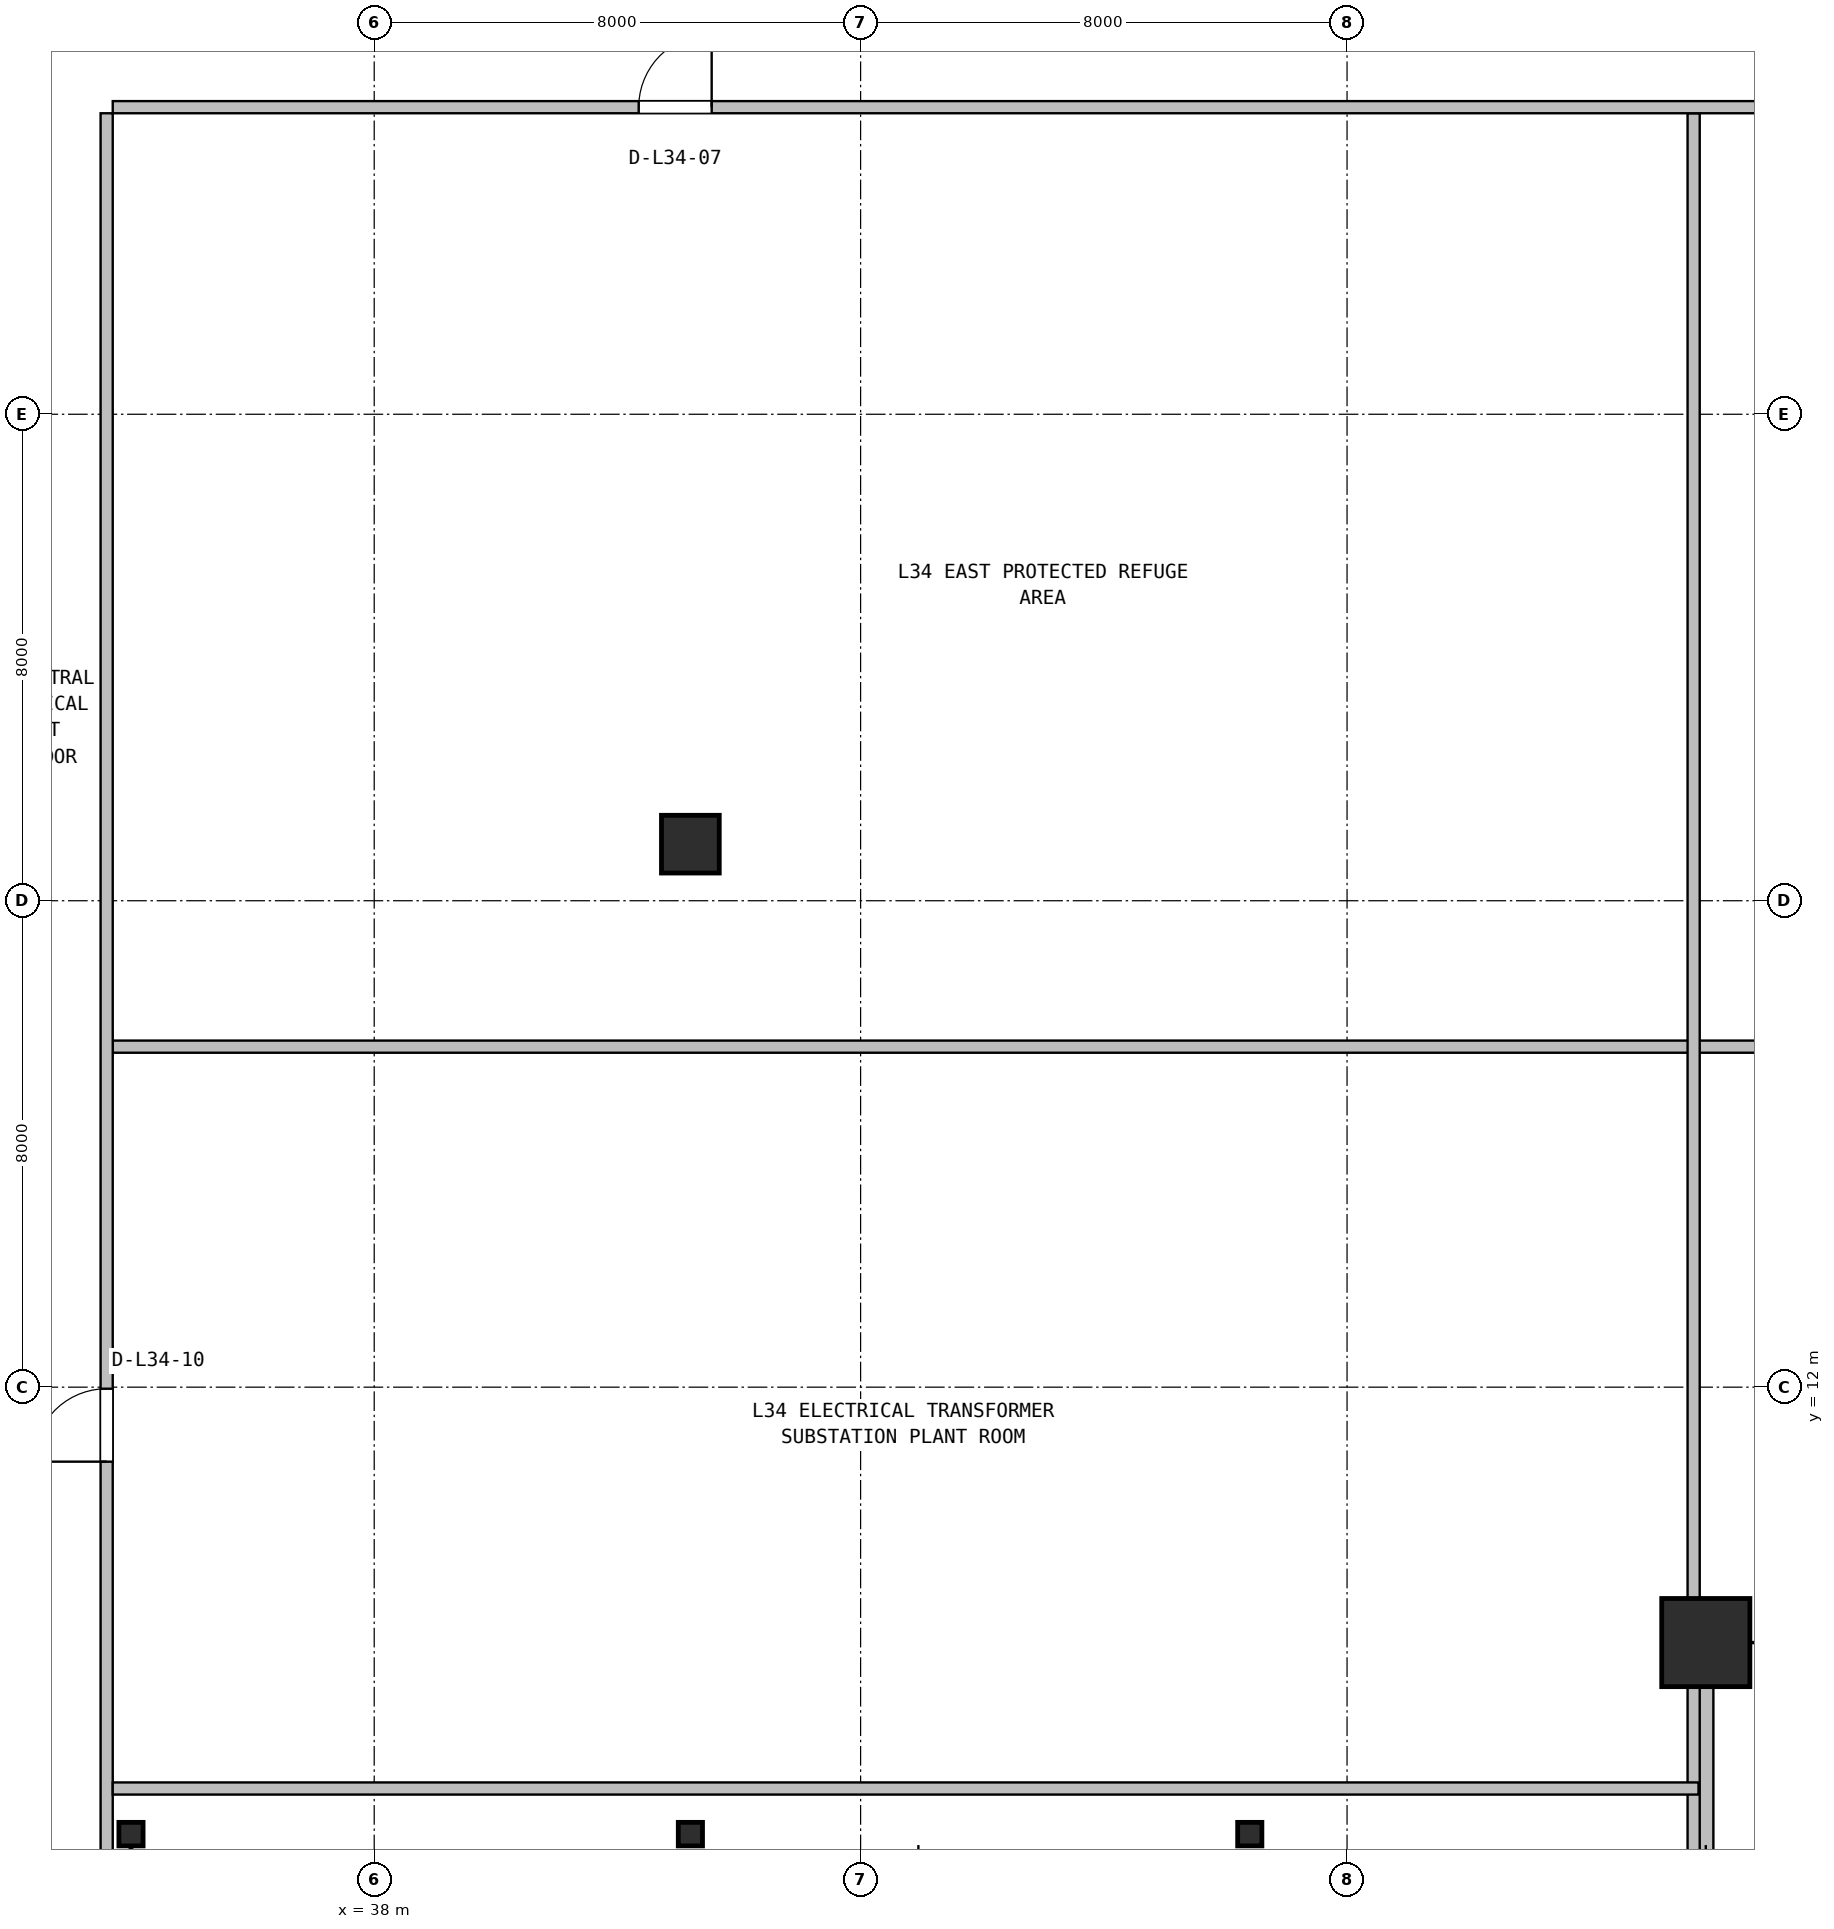
"""IFC4 building model, lengths in metres.
Left out: names, types, materials, properties, quantities, classifications, styles, units other than length and angle.
Written with IfcOpenShell. Run it as: python <this file> out.ifc"""

import sys

from ifc_helpers import new_model, si_unit, direction, frame, frame_2d, origin, origin_2d, place, context, subcontext, project, spatial, rectangle, hollow_rectangle, i_section, extrude, source, transform, mapped, element, fill, save


model = new_model("IFC4")
c1 = context("Model", 3, precision=1e-05, world=origin(), true_north=direction((0.0, 1.0)))
c2 = subcontext(c1, "Body", "Model", "MODEL_VIEW")
j1 = project(units=[si_unit("LENGTHUNIT", "METRE"), si_unit("PLANEANGLEUNIT", "RADIAN")], contexts=[c1])
p1 = place(None, origin())
s1 = spatial("IfcSite", under=j1, at=p1, CompositionType="ELEMENT")
p2 = place(p1, origin())
s2 = spatial("IfcBuilding", under=s1, at=p2, CompositionType="ELEMENT")
p3 = place(p2, frame((0.0, 0.0, 141.0)))
s3 = spatial("IfcBuildingStorey", under=s2, at=p3, CompositionType="ELEMENT", Elevation=141.0)
m1 = source(origin(), c2, "Body", "SweptSolid", [
    extrude(hollow_rectangle(XDim=1.45, YDim=1.45, WallThickness=0.055, at=origin_2d()), origin(), (0.0, 0.0, 1.0), 4.8),
])
p4 = place(p3, frame((59.9, 7.8, 0.0), z_axis=(0.0, 0.0, 1.0), x_axis=(1.0, 0.0, 0.0)))
e1 = element("IfcColumn", 1, at=p4, inside=s3, PredefinedType="COLUMN", context=c2, shape_type="MappedRepresentation", body=[
    mapped(m1, transform((0.0, 0.0, 0.0), x_axis=(1.0, 0.0, 0.0), y_axis=(0.0, 1.0, 0.0), z_axis=(0.0, 0.0, 1.0), scale=1.0)),
])
m2 = source(origin(), c2, "Body", "SweptSolid", [
    extrude(i_section(OverallWidth=0.398, OverallDepth=0.387, WebThickness=0.021, FlangeThickness=0.033, FilletRadius=0.018, at=origin_2d()), origin(), (0.0, 0.0, 1.0), 4.8),
])
for number, where, z_axis, x_axis in (
    (2, (34.0, 4.65, 0.0), (0.0, 0.0, 1.0), (1.0, 0.0, 0.0)),
    (3, (43.2, 4.65, 0.0), (0.0, 0.0, 1.0), (1.0, 0.0, 0.0)),
    (4, (52.4, 4.65, 0.0), (0.0, 0.0, 1.0), (1.0, 0.0, 0.0)),
):
    element("IfcColumn", number, at=place(p3, frame(where, z_axis=z_axis, x_axis=x_axis)), inside=s3, PredefinedType="COLUMN", context=c2, shape_type="MappedRepresentation", body=[
        mapped(m2, transform((0.0, 0.0, 0.0), x_axis=(1.0, 0.0, 0.0), y_axis=(0.0, 1.0, 0.0), z_axis=(0.0, 0.0, 1.0), scale=1.0)),
    ])
m3 = source(origin(), c2, "Body", "SweptSolid", [
    extrude(rectangle(XDim=0.95, YDim=0.95, at=origin_2d()), origin(), (0.0, 0.0, 1.0), 4.8),
])
p5 = place(p3, frame((43.2, 20.93, 0.0), z_axis=(0.0, 0.0, 1.0), x_axis=(1.0, 0.0, 0.0)))
e5 = element("IfcColumn", 5, at=p5, inside=s3, PredefinedType="COLUMN", context=c2, shape_type="MappedRepresentation", body=[
    mapped(m3, transform((0.0, 0.0, 0.0), x_axis=(1.0, 0.0, 0.0), y_axis=(0.0, 1.0, 0.0), z_axis=(0.0, 0.0, 1.0), scale=1.0)),
])
p6 = place(p3, frame((59.9, 4.28, 0.0), z_axis=(0.0, 0.0, 1.0), x_axis=(0.0, 1.0, 0.0)))
e6 = element("IfcWall", 6, at=p6, inside=s3, PredefinedType="SOLIDWALL", context=c2, shape_type="SweptSolid", body=[
    extrude(rectangle(XDim=3.6, YDim=0.25, at=frame_2d((1.8, 0.0))), origin(), (0.0, 0.0, 1.0), 2.925),
])
p7 = place(p3, frame((33.7, 17.6, 0.0), z_axis=(0.0, 0.0, 1.0), x_axis=(1.0, 0.0, 0.0)))
e7 = element("IfcWall", 7, at=p7, inside=s3, PredefinedType="SOLIDWALL", context=c2, shape_type="SweptSolid", body=[
    extrude(rectangle(XDim=29.62, YDim=0.2, at=frame_2d((14.81, 0.0))), origin(), (0.0, 0.0, 1.0), 2.925),
])
p8 = place(p3, frame((59.7, 4.38, 0.0), z_axis=(0.0, 0.0, 1.0), x_axis=(0.0, 1.0, 0.0)))
e8 = element("IfcWall", 8, at=p8, inside=s3, PredefinedType="SOLIDWALL", context=c2, shape_type="SweptSolid", body=[
    extrude(rectangle(XDim=28.57, YDim=0.2, at=frame_2d((14.285, 0.0))), origin(), (0.0, 0.0, 1.0), 2.925),
])
p9 = place(p3, frame((33.7, 33.05, 0.0), z_axis=(0.0, 0.0, 1.0), x_axis=(1.0, 0.0, 0.0)))
e9 = element("IfcWall", 9, at=p9, inside=s3, PredefinedType="SOLIDWALL", context=c2, shape_type="SweptSolid", body=[
    extrude(rectangle(XDim=29.62, YDim=0.2, at=frame_2d((14.81, 0.0))), origin(), (0.0, 0.0, 1.0), 2.925),
])
p10 = place(p9, frame((8.65, 0.0, 0.0)))
e10 = element("IfcOpeningElement", 10, at=p10, cuts=e9, PredefinedType="OPENING", context=c2, shape_type="SweptSolid", body=[
    extrude(rectangle(XDim=1.2, YDim=2.1, at=frame_2d((0.6, 1.05))), frame((0.0, 0.11, 0.0), z_axis=(0.0, -1.0, 0.0), x_axis=(1.0, 0.0, 0.0)), (0.0, 0.0, 1.0), 0.22),
])
p11 = place(p3, frame((33.6, 4.38, 0.0), z_axis=(0.0, 0.0, 1.0), x_axis=(0.0, 1.0, 0.0)))
e11 = element("IfcWall", 11, at=p11, inside=s3, PredefinedType="SOLIDWALL", context=c2, shape_type="SweptSolid", body=[
    extrude(rectangle(XDim=28.57, YDim=0.2, at=frame_2d((14.285, 0.0))), origin(), (0.0, 0.0, 1.0), 2.925),
])
p12 = place(p11, frame((6.395, 0.0, 0.0)))
e12 = element("IfcOpeningElement", 12, at=p12, cuts=e11, PredefinedType="OPENING", context=c2, shape_type="SweptSolid", body=[
    extrude(rectangle(XDim=1.2, YDim=2.1, at=frame_2d((0.6, 1.05))), frame((0.0, 0.11, 0.0), z_axis=(0.0, -1.0, 0.0), x_axis=(1.0, 0.0, 0.0)), (0.0, 0.0, 1.0), 0.22),
])
p13 = place(p3, frame((33.7, 5.4, 0.0), z_axis=(0.0, 0.0, 1.0), x_axis=(1.0, 0.0, 0.0)))
e13 = element("IfcWall", 13, at=p13, inside=s3, PredefinedType="SOLIDWALL", context=c2, shape_type="SweptSolid", body=[
    extrude(rectangle(XDim=26.08, YDim=0.2, at=frame_2d((13.04, 0.0))), origin(), (0.0, 0.0, 1.0), 2.925),
])
m4 = source(origin(), c2, "Body", "SweptSolid", [
    extrude(rectangle(XDim=1.2, YDim=2.1, at=frame_2d((0.6, 1.05))), frame((0.0, 0.025, 0.0), z_axis=(0.0, -1.0, 0.0), x_axis=(1.0, 0.0, 0.0)), (0.0, 0.0, 1.0), 0.05),
])
p14 = place(p10, origin())
e14 = element("IfcDoor", 14, at=p14, inside=s3, OperationType="SINGLE_SWING_RIGHT", PredefinedType="DOOR", context=c2, shape_type="MappedRepresentation", body=[
    mapped(m4, transform((0.0, 0.0, 0.0), x_axis=(1.0, 0.0, 0.0), y_axis=(0.0, 1.0, 0.0), z_axis=(0.0, 0.0, 1.0), scale=1.0)),
])
fill(e10, e14)
p15 = place(p12, origin())
e15 = element("IfcDoor", 15, at=p15, inside=s3, OperationType="SINGLE_SWING_LEFT", PredefinedType="DOOR", context=c2, shape_type="MappedRepresentation", body=[
    mapped(m4, transform((0.0, 0.0, 0.0), x_axis=(1.0, 0.0, 0.0), y_axis=(0.0, 1.0, 0.0), z_axis=(0.0, 0.0, 1.0), scale=1.0)),
])
fill(e12, e15)
save(model, sys.argv[1])
